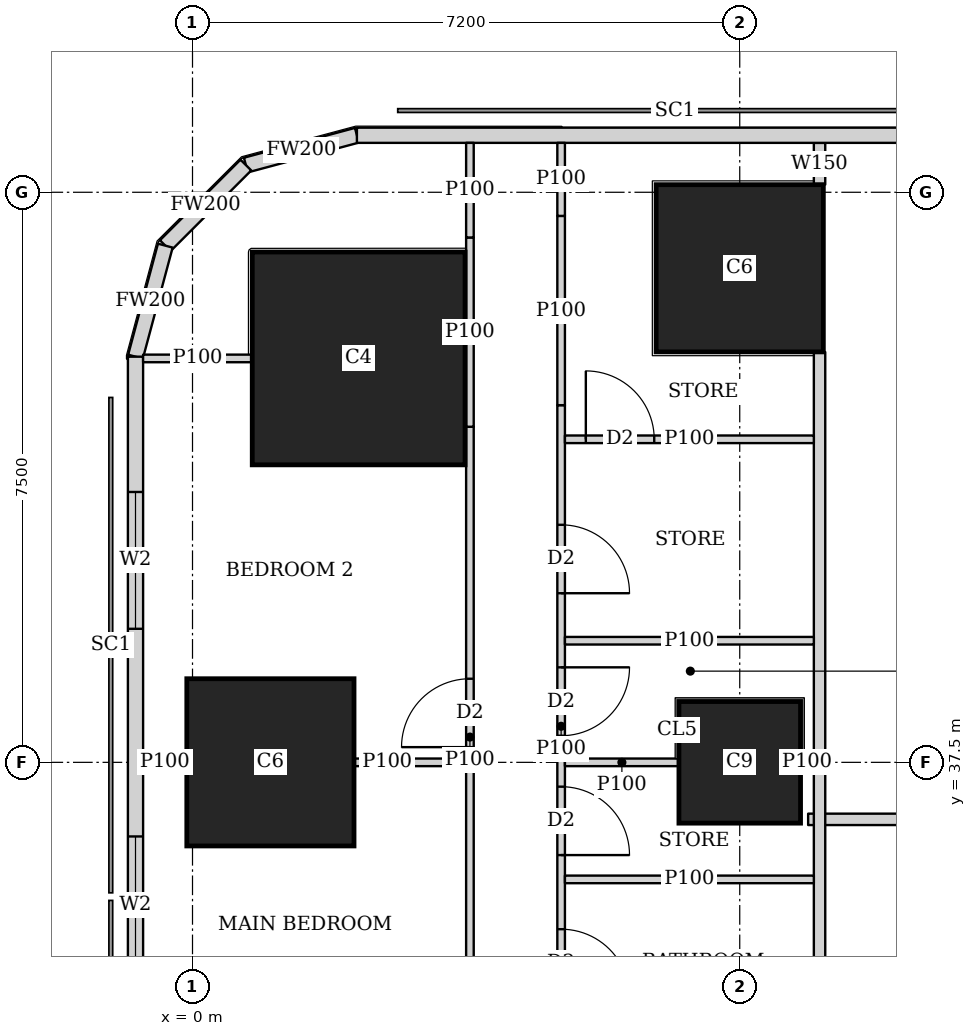
"""IFC4 building model, lengths in metres.
Left out: names, types, materials, properties, quantities, classifications, styles, units other than length and angle.
Written with IfcOpenShell. Run it as: python <this file> out.ifc"""

import sys

from ifc_helpers import new_model, si_unit, direction, frame, frame_2d, origin, origin_2d, place, context, subcontext, project, spatial, rectangle, extrude, element, fill, save


model = new_model("IFC4")
c1 = context("Model", 3, precision=1e-05, world=origin(), true_north=direction((0.0, 1.0)))
c2 = subcontext(c1, "Body", "Model", "MODEL_VIEW")
j1 = project(units=[si_unit("LENGTHUNIT", "METRE"), si_unit("PLANEANGLEUNIT", "RADIAN")], contexts=[c1])
p1 = place(None, origin())
s1 = spatial("IfcSite", under=j1, at=p1, CompositionType="ELEMENT")
p2 = place(p1, origin())
s2 = spatial("IfcBuilding", under=s1, at=p2, CompositionType="ELEMENT")
p3 = place(p2, frame((0.0, 0.0, 126.65)))
s3 = spatial("IfcBuildingStorey", under=s2, at=p3, CompositionType="ELEMENT", Elevation=126.65)
p4 = place(p3, frame((1.025, 37.5, 0.0), z_axis=(0.0, 0.0, 1.0), x_axis=(1.0, 0.0, 0.0)))
e1 = element("IfcColumn", 1, at=p4, inside=s3, PredefinedType="COLUMN", context=c2, shape_type="SweptSolid", body=[
    extrude(rectangle(XDim=2.2, YDim=2.2, at=origin_2d()), origin(), (0.0, 0.0, 1.0), 3.75),
])
p5 = place(p3, frame((7.2, 37.5, 0.0), z_axis=(0.0, 0.0, 1.0), x_axis=(1.0, 0.0, 0.0)))
e2 = element("IfcColumn", 2, at=p5, inside=s3, PredefinedType="COLUMN", context=c2, shape_type="SweptSolid", body=[
    extrude(rectangle(XDim=1.6, YDim=1.6, at=origin_2d()), origin(), (0.0, 0.0, 1.0), 3.75),
])
p6 = place(p3, frame((2.186, 42.814, 0.0), z_axis=(0.0, 0.0, 1.0), x_axis=(1.0, 0.0, 0.0)))
e3 = element("IfcColumn", 3, at=p6, inside=s3, PredefinedType="COLUMN", context=c2, shape_type="SweptSolid", body=[
    extrude(rectangle(XDim=2.8, YDim=2.8, at=origin_2d()), origin(), (0.0, 0.0, 1.0), 3.75),
])
p7 = place(p3, frame((7.2, 44.0, 0.0), z_axis=(0.0, 0.0, 1.0), x_axis=(1.0, 0.0, 0.0)))
e4 = element("IfcColumn", 4, at=p7, inside=s3, PredefinedType="COLUMN", context=c2, shape_type="SweptSolid", body=[
    extrude(rectangle(XDim=2.2, YDim=2.2, at=origin_2d()), origin(), (0.0, 0.0, 1.0), 3.75),
])
p8 = place(p3, frame((40.106, 45.75, 0.0), z_axis=(0.0, 0.0, 1.0), x_axis=(-1.0, 0.0, 0.0)))
e5 = element("IfcWall", 5, at=p8, inside=s3, PredefinedType="SOLIDWALL", context=c2, shape_type="SweptSolid", body=[
    extrude(rectangle(XDim=37.943, YDim=0.2, at=frame_2d((18.971, 0.0))), origin(), (0.0, 0.0, 1.0), 3.45),
])
p9 = place(p8, frame((8.606, 0.0, 0.9)))
e6 = element("IfcOpeningElement", 6, at=p9, cuts=e5, PredefinedType="OPENING", context=c2, shape_type="SweptSolid", body=[
    extrude(rectangle(XDim=1.8, YDim=1.5, at=frame_2d((0.9, 0.75))), frame((0.0, 0.11, 0.0), z_axis=(0.0, -1.0, 0.0), x_axis=(1.0, 0.0, 0.0)), (0.0, 0.0, 1.0), 0.22),
])
p10 = place(p8, frame((12.206, 0.0, 0.9)))
e7 = element("IfcOpeningElement", 7, at=p10, cuts=e5, PredefinedType="OPENING", context=c2, shape_type="SweptSolid", body=[
    extrude(rectangle(XDim=1.8, YDim=1.5, at=frame_2d((0.9, 0.75))), frame((0.0, 0.11, 0.0), z_axis=(0.0, -1.0, 0.0), x_axis=(1.0, 0.0, 0.0)), (0.0, 0.0, 1.0), 0.22),
])
p11 = place(p8, frame((15.806, 0.0, 0.9)))
e8 = element("IfcOpeningElement", 8, at=p11, cuts=e5, PredefinedType="OPENING", context=c2, shape_type="SweptSolid", body=[
    extrude(rectangle(XDim=1.8, YDim=1.5, at=frame_2d((0.9, 0.75))), frame((0.0, 0.11, 0.0), z_axis=(0.0, -1.0, 0.0), x_axis=(1.0, 0.0, 0.0)), (0.0, 0.0, 1.0), 0.22),
])
p12 = place(p8, frame((19.406, 0.0, 0.9)))
e9 = element("IfcOpeningElement", 9, at=p12, cuts=e5, PredefinedType="OPENING", context=c2, shape_type="SweptSolid", body=[
    extrude(rectangle(XDim=1.8, YDim=1.5, at=frame_2d((0.9, 0.75))), frame((0.0, 0.11, 0.0), z_axis=(0.0, -1.0, 0.0), x_axis=(1.0, 0.0, 0.0)), (0.0, 0.0, 1.0), 0.22),
])
p13 = place(p8, frame((23.006, 0.0, 0.9)))
e10 = element("IfcOpeningElement", 10, at=p13, cuts=e5, PredefinedType="OPENING", context=c2, shape_type="SweptSolid", body=[
    extrude(rectangle(XDim=1.8, YDim=1.5, at=frame_2d((0.9, 0.75))), frame((0.0, 0.11, 0.0), z_axis=(0.0, -1.0, 0.0), x_axis=(1.0, 0.0, 0.0)), (0.0, 0.0, 1.0), 0.22),
])
p14 = place(p8, frame((26.606, 0.0, 0.9)))
e11 = element("IfcOpeningElement", 11, at=p14, cuts=e5, PredefinedType="OPENING", context=c2, shape_type="SweptSolid", body=[
    extrude(rectangle(XDim=1.8, YDim=1.5, at=frame_2d((0.9, 0.75))), frame((0.0, 0.11, 0.0), z_axis=(0.0, -1.0, 0.0), x_axis=(1.0, 0.0, 0.0)), (0.0, 0.0, 1.0), 0.22),
])
p15 = place(p3, frame((2.163, 45.75, 0.0), z_axis=(0.0, 0.0, 1.0), x_axis=(-0.965832000415, -0.259168954497, 0.0)))
e12 = element("IfcWall", 12, at=p15, inside=s3, PredefinedType="SOLIDWALL", context=c2, shape_type="SweptSolid", body=[
    extrude(rectangle(XDim=1.513, YDim=0.2, at=frame_2d((0.756, 0.0))), origin(), (0.0, 0.0, 1.0), 3.45),
])
p16 = place(p3, frame((0.702, 45.358, 0.0), z_axis=(0.0, 0.0, 1.0), x_axis=(-0.707106781187, -0.707106781187, 0.0)))
e13 = element("IfcWall", 13, at=p16, inside=s3, PredefinedType="SOLIDWALL", context=c2, shape_type="SweptSolid", body=[
    extrude(rectangle(XDim=1.499, YDim=0.2, at=frame_2d((0.75, 0.0))), origin(), (0.0, 0.0, 1.0), 3.45),
])
p17 = place(p3, frame((-0.358, 44.298, 0.0), z_axis=(0.0, 0.0, 1.0), x_axis=(-0.259168954497, -0.965832000415, 0.0)))
e14 = element("IfcWall", 14, at=p17, inside=s3, PredefinedType="SOLIDWALL", context=c2, shape_type="SweptSolid", body=[
    extrude(rectangle(XDim=1.513, YDim=0.2, at=frame_2d((0.756, 0.0))), origin(), (0.0, 0.0, 1.0), 3.45),
])
p18 = place(p3, frame((-0.75, 42.837, 0.0), z_axis=(0.0, 0.0, 1.0), x_axis=(0.0, -1.0, 0.0)))
e15 = element("IfcWall", 15, at=p18, inside=s3, PredefinedType="SOLIDWALL", context=c2, shape_type="SweptSolid", body=[
    extrude(rectangle(XDim=40.674, YDim=0.2, at=frame_2d((20.337, 0.0))), origin(), (0.0, 0.0, 1.0), 3.45),
])
p19 = place(p18, frame((1.78, 0.0, 0.9)))
e16 = element("IfcOpeningElement", 16, at=p19, cuts=e15, PredefinedType="OPENING", context=c2, shape_type="SweptSolid", body=[
    extrude(rectangle(XDim=1.8, YDim=1.5, at=frame_2d((0.9, 0.75))), frame((0.0, 0.11, 0.0), z_axis=(0.0, -1.0, 0.0), x_axis=(1.0, 0.0, 0.0)), (0.0, 0.0, 1.0), 0.22),
])
p20 = place(p18, frame((6.312, 0.0, 0.9)))
e17 = element("IfcOpeningElement", 17, at=p20, cuts=e15, PredefinedType="OPENING", context=c2, shape_type="SweptSolid", body=[
    extrude(rectangle(XDim=1.8, YDim=1.5, at=frame_2d((0.9, 0.75))), frame((0.0, 0.11, 0.0), z_axis=(0.0, -1.0, 0.0), x_axis=(1.0, 0.0, 0.0)), (0.0, 0.0, 1.0), 0.22),
])
p21 = place(p18, frame((10.062, 0.0, 0.9)))
e18 = element("IfcOpeningElement", 18, at=p21, cuts=e15, PredefinedType="OPENING", context=c2, shape_type="SweptSolid", body=[
    extrude(rectangle(XDim=1.8, YDim=1.5, at=frame_2d((0.9, 0.75))), frame((0.0, 0.11, 0.0), z_axis=(0.0, -1.0, 0.0), x_axis=(1.0, 0.0, 0.0)), (0.0, 0.0, 1.0), 0.22),
])
p22 = place(p18, frame((13.812, 0.0, 0.9)))
e19 = element("IfcOpeningElement", 19, at=p22, cuts=e15, PredefinedType="OPENING", context=c2, shape_type="SweptSolid", body=[
    extrude(rectangle(XDim=1.8, YDim=1.5, at=frame_2d((0.9, 0.75))), frame((0.0, 0.11, 0.0), z_axis=(0.0, -1.0, 0.0), x_axis=(1.0, 0.0, 0.0)), (0.0, 0.0, 1.0), 0.22),
])
p23 = place(p18, frame((17.562, 0.0, 0.9)))
e20 = element("IfcOpeningElement", 20, at=p23, cuts=e15, PredefinedType="OPENING", context=c2, shape_type="SweptSolid", body=[
    extrude(rectangle(XDim=1.8, YDim=1.5, at=frame_2d((0.9, 0.75))), frame((0.0, 0.11, 0.0), z_axis=(0.0, -1.0, 0.0), x_axis=(1.0, 0.0, 0.0)), (0.0, 0.0, 1.0), 0.22),
])
p24 = place(p18, frame((21.312, 0.0, 0.9)))
e21 = element("IfcOpeningElement", 21, at=p24, cuts=e15, PredefinedType="OPENING", context=c2, shape_type="SweptSolid", body=[
    extrude(rectangle(XDim=1.8, YDim=1.5, at=frame_2d((0.9, 0.75))), frame((0.0, 0.11, 0.0), z_axis=(0.0, -1.0, 0.0), x_axis=(1.0, 0.0, 0.0)), (0.0, 0.0, 1.0), 0.22),
])
p25 = place(p18, frame((25.062, 0.0, 0.9)))
e22 = element("IfcOpeningElement", 22, at=p25, cuts=e15, PredefinedType="OPENING", context=c2, shape_type="SweptSolid", body=[
    extrude(rectangle(XDim=1.8, YDim=1.5, at=frame_2d((0.9, 0.75))), frame((0.0, 0.11, 0.0), z_axis=(0.0, -1.0, 0.0), x_axis=(1.0, 0.0, 0.0)), (0.0, 0.0, 1.0), 0.22),
])
p26 = place(p18, frame((28.812, 0.0, 0.9)))
e23 = element("IfcOpeningElement", 23, at=p26, cuts=e15, PredefinedType="OPENING", context=c2, shape_type="SweptSolid", body=[
    extrude(rectangle(XDim=1.8, YDim=1.5, at=frame_2d((0.9, 0.75))), frame((0.0, 0.11, 0.0), z_axis=(0.0, -1.0, 0.0), x_axis=(1.0, 0.0, 0.0)), (0.0, 0.0, 1.0), 0.22),
])
p27 = place(p18, frame((32.562, 0.0, 0.9)))
e24 = element("IfcOpeningElement", 24, at=p27, cuts=e15, PredefinedType="OPENING", context=c2, shape_type="SweptSolid", body=[
    extrude(rectangle(XDim=1.8, YDim=1.5, at=frame_2d((0.9, 0.75))), frame((0.0, 0.11, 0.0), z_axis=(0.0, -1.0, 0.0), x_axis=(1.0, 0.0, 0.0)), (0.0, 0.0, 1.0), 0.22),
])
p28 = place(p18, frame((37.094, 0.0, 0.9)))
e25 = element("IfcOpeningElement", 25, at=p28, cuts=e15, PredefinedType="OPENING", context=c2, shape_type="SweptSolid", body=[
    extrude(rectangle(XDim=1.8, YDim=1.5, at=frame_2d((0.9, 0.75))), frame((0.0, 0.11, 0.0), z_axis=(0.0, -1.0, 0.0), x_axis=(1.0, 0.0, 0.0)), (0.0, 0.0, 1.0), 0.22),
])
p29 = place(p3, frame((8.25, 2.126, 0.0), z_axis=(0.0, 0.0, 1.0), x_axis=(0.0, 1.0, 0.0)))
e26 = element("IfcWall", 26, at=p29, inside=s3, PredefinedType="SOLIDWALL", context=c2, shape_type="SweptSolid", body=[
    extrude(rectangle(XDim=40.773, YDim=0.15, at=frame_2d((20.386, 0.0))), origin(), (0.0, 0.0, 1.0), 3.45),
])
p30 = place(p29, frame((10.286, 0.0, 0.0)))
e27 = element("IfcOpeningElement", 27, at=p30, cuts=e26, PredefinedType="OPENING", context=c2, shape_type="SweptSolid", body=[
    extrude(rectangle(XDim=1.0, YDim=2.1, at=frame_2d((0.5, 1.05))), frame((0.0, 0.085, 0.0), z_axis=(0.0, -1.0, 0.0), x_axis=(1.0, 0.0, 0.0)), (0.0, 0.0, 1.0), 0.17),
])
p31 = place(p29, frame((14.461, 0.0, 0.0)))
e28 = element("IfcOpeningElement", 28, at=p31, cuts=e26, PredefinedType="OPENING", context=c2, shape_type="SweptSolid", body=[
    extrude(rectangle(XDim=1.0, YDim=2.1, at=frame_2d((0.5, 1.05))), frame((0.0, 0.085, 0.0), z_axis=(0.0, -1.0, 0.0), x_axis=(1.0, 0.0, 0.0)), (0.0, 0.0, 1.0), 0.17),
])
p32 = place(p29, frame((21.962, 0.0, 0.0)))
e29 = element("IfcOpeningElement", 29, at=p32, cuts=e26, PredefinedType="OPENING", context=c2, shape_type="SweptSolid", body=[
    extrude(rectangle(XDim=1.0, YDim=2.1, at=frame_2d((0.5, 1.05))), frame((0.0, 0.085, 0.0), z_axis=(0.0, -1.0, 0.0), x_axis=(1.0, 0.0, 0.0)), (0.0, 0.0, 1.0), 0.17),
])
p33 = place(p29, frame((29.461, 0.0, 0.0)))
e30 = element("IfcOpeningElement", 30, at=p33, cuts=e26, PredefinedType="OPENING", context=c2, shape_type="SweptSolid", body=[
    extrude(rectangle(XDim=1.0, YDim=2.1, at=frame_2d((0.5, 1.05))), frame((0.0, 0.085, 0.0), z_axis=(0.0, -1.0, 0.0), x_axis=(1.0, 0.0, 0.0)), (0.0, 0.0, 1.0), 0.17),
])
p34 = place(p3, frame((8.25, 45.101, 0.0), z_axis=(0.0, 0.0, 1.0), x_axis=(0.0, 1.0, 0.0)))
e31 = element("IfcWall", 31, at=p34, inside=s3, PredefinedType="SOLIDWALL", context=c2, shape_type="SweptSolid", body=[
    extrude(rectangle(XDim=0.549, YDim=0.15, at=frame_2d((0.274, 0.0))), origin(), (0.0, 0.0, 1.0), 3.45),
])
p35 = place(p3, frame((8.1, 36.75, 0.0), z_axis=(0.0, 0.0, 1.0), x_axis=(1.0, 0.0, 0.0)))
e32 = element("IfcWall", 32, at=p35, inside=s3, PredefinedType="SOLIDWALL", context=c2, shape_type="SweptSolid", body=[
    extrude(rectangle(XDim=5.499, YDim=0.15, at=frame_2d((2.75, 0.0))), origin(), (0.0, 0.0, 1.0), 3.45),
])
p36 = place(p35, frame((2.725, 0.0, 0.0)))
e33 = element("IfcOpeningElement", 33, at=p36, cuts=e32, PredefinedType="OPENING", context=c2, shape_type="SweptSolid", body=[
    extrude(rectangle(XDim=1.0, YDim=2.1, at=frame_2d((0.5, 1.05))), frame((0.0, 0.085, 0.0), z_axis=(0.0, -1.0, 0.0), x_axis=(1.0, 0.0, 0.0)), (0.0, 0.0, 1.0), 0.17),
])
p37 = place(p3, frame((3.65, 33.75, 0.0), z_axis=(0.0, 0.0, 1.0), x_axis=(0.0, 1.0, 0.0)))
e34 = element("IfcWall", 34, at=p37, inside=s3, PredefinedType="PARTITIONING", context=c2, shape_type="SweptSolid", body=[
    extrude(rectangle(XDim=8.165, YDim=0.1, at=frame_2d((4.083, 0.0))), origin(), (0.0, 0.0, 1.0), 3.45),
])
p38 = place(p37, frame((0.2, 0.0, 0.0)))
e35 = element("IfcOpeningElement", 35, at=p38, cuts=e34, PredefinedType="OPENING", context=c2, shape_type="SweptSolid", body=[
    extrude(rectangle(XDim=0.9, YDim=2.1, at=frame_2d((0.45, 1.05))), frame((0.0, 0.06, 0.0), z_axis=(0.0, -1.0, 0.0), x_axis=(1.0, 0.0, 0.0)), (0.0, 0.0, 1.0), 0.12),
])
p39 = place(p37, frame((3.95, 0.0, 0.0)))
e36 = element("IfcOpeningElement", 36, at=p39, cuts=e34, PredefinedType="OPENING", context=c2, shape_type="SweptSolid", body=[
    extrude(rectangle(XDim=0.9, YDim=2.1, at=frame_2d((0.45, 1.05))), frame((0.0, 0.06, 0.0), z_axis=(0.0, -1.0, 0.0), x_axis=(1.0, 0.0, 0.0)), (0.0, 0.0, 1.0), 0.12),
])
p40 = place(p3, frame((3.65, 41.915, 0.0), z_axis=(0.0, 0.0, 1.0), x_axis=(0.0, 1.0, 0.0)))
e37 = element("IfcWall", 37, at=p40, inside=s3, PredefinedType="PARTITIONING", context=c2, shape_type="SweptSolid", body=[
    extrude(rectangle(XDim=2.49, YDim=0.1, at=frame_2d((1.245, 0.0))), origin(), (0.0, 0.0, 1.0), 2.0),
])
p41 = place(p3, frame((3.65, 44.405, 0.0), z_axis=(0.0, 0.0, 1.0), x_axis=(0.0, 1.0, 0.0)))
e38 = element("IfcWall", 38, at=p41, inside=s3, PredefinedType="PARTITIONING", context=c2, shape_type="SweptSolid", body=[
    extrude(rectangle(XDim=1.245, YDim=0.1, at=frame_2d((0.623, 0.0))), origin(), (0.0, 0.0, 1.0), 3.45),
])
p42 = place(p3, frame((4.85, 33.75, 0.0), z_axis=(0.0, 0.0, 1.0), x_axis=(0.0, 1.0, 0.0)))
e39 = element("IfcWall", 39, at=p42, inside=s3, PredefinedType="PARTITIONING", context=c2, shape_type="SweptSolid", body=[
    extrude(rectangle(XDim=8.449, YDim=0.1, at=frame_2d((4.225, 0.0))), origin(), (0.0, 0.0, 1.0), 3.45),
])
p43 = place(p42, frame((0.655, 0.0, 0.0)))
e40 = element("IfcOpeningElement", 40, at=p43, cuts=e39, PredefinedType="OPENING", context=c2, shape_type="SweptSolid", body=[
    extrude(rectangle(XDim=0.9, YDim=2.1, at=frame_2d((0.45, 1.05))), frame((0.0, 0.06, 0.0), z_axis=(0.0, -1.0, 0.0), x_axis=(1.0, 0.0, 0.0)), (0.0, 0.0, 1.0), 0.12),
])
p44 = place(p42, frame((4.1, 0.0, 0.0)))
e41 = element("IfcOpeningElement", 41, at=p44, cuts=e39, PredefinedType="OPENING", context=c2, shape_type="SweptSolid", body=[
    extrude(rectangle(XDim=0.9, YDim=2.1, at=frame_2d((0.45, 1.05))), frame((0.0, 0.06, 0.0), z_axis=(0.0, -1.0, 0.0), x_axis=(1.0, 0.0, 0.0)), (0.0, 0.0, 1.0), 0.12),
])
p45 = place(p42, frame((2.53, 0.0, 0.0)))
e42 = element("IfcOpeningElement", 42, at=p45, cuts=e39, PredefinedType="OPENING", context=c2, shape_type="SweptSolid", body=[
    extrude(rectangle(XDim=0.9, YDim=2.1, at=frame_2d((0.45, 1.05))), frame((0.0, 0.06, 0.0), z_axis=(0.0, -1.0, 0.0), x_axis=(1.0, 0.0, 0.0)), (0.0, 0.0, 1.0), 0.12),
])
p46 = place(p42, frame((5.975, 0.0, 0.0)))
e43 = element("IfcOpeningElement", 43, at=p46, cuts=e39, PredefinedType="OPENING", context=c2, shape_type="SweptSolid", body=[
    extrude(rectangle(XDim=0.9, YDim=2.1, at=frame_2d((0.45, 1.05))), frame((0.0, 0.06, 0.0), z_axis=(0.0, -1.0, 0.0), x_axis=(1.0, 0.0, 0.0)), (0.0, 0.0, 1.0), 0.12),
])
p47 = place(p3, frame((4.85, 42.199, 0.0), z_axis=(0.0, 0.0, 1.0), x_axis=(0.0, 1.0, 0.0)))
e44 = element("IfcWall", 44, at=p47, inside=s3, PredefinedType="PARTITIONING", context=c2, shape_type="SweptSolid", body=[
    extrude(rectangle(XDim=2.49, YDim=0.1, at=frame_2d((1.245, 0.0))), origin(), (0.0, 0.0, 1.0), 2.0),
])
p48 = place(p3, frame((4.85, 44.689, 0.0), z_axis=(0.0, 0.0, 1.0), x_axis=(0.0, 1.0, 0.0)))
e45 = element("IfcWall", 45, at=p48, inside=s3, PredefinedType="PARTITIONING", context=c2, shape_type="SweptSolid", body=[
    extrude(rectangle(XDim=0.961, YDim=0.1, at=frame_2d((0.48, 0.0))), origin(), (0.0, 0.0, 1.0), 3.45),
])
p49 = place(p3, frame((-0.65, 37.5, 0.0), z_axis=(0.0, 0.0, 1.0), x_axis=(1.0, 0.0, 0.0)))
e46 = element("IfcWall", 46, at=p49, inside=s3, PredefinedType="PARTITIONING", context=c2, shape_type="SweptSolid", body=[
    extrude(rectangle(XDim=0.574, YDim=0.1, at=frame_2d((0.287, 0.0))), origin(), (0.0, 0.0, 1.0), 2.0),
])
p50 = place(p3, frame((2.126, 37.5, 0.0), z_axis=(0.0, 0.0, 1.0), x_axis=(1.0, 0.0, 0.0)))
e47 = element("IfcWall", 47, at=p50, inside=s3, PredefinedType="PARTITIONING", context=c2, shape_type="SweptSolid", body=[
    extrude(rectangle(XDim=1.474, YDim=0.1, at=frame_2d((0.737, 0.0))), origin(), (0.0, 0.0, 1.0), 2.0),
])
p51 = place(p3, frame((-0.65, 42.814, 0.0), z_axis=(0.0, 0.0, 1.0), x_axis=(1.0, 0.0, 0.0)))
e48 = element("IfcWall", 48, at=p51, inside=s3, PredefinedType="PARTITIONING", context=c2, shape_type="SweptSolid", body=[
    extrude(rectangle(XDim=1.435, YDim=0.1, at=frame_2d((0.717, 0.0))), origin(), (0.0, 0.0, 1.0), 3.45),
])
p52 = place(p3, frame((4.9, 37.5, 0.0), z_axis=(0.0, 0.0, 1.0), x_axis=(1.0, 0.0, 0.0)))
e49 = element("IfcWall", 49, at=p52, inside=s3, PredefinedType="PARTITIONING", context=c2, shape_type="SweptSolid", body=[
    extrude(rectangle(XDim=1.499, YDim=0.1, at=frame_2d((0.75, 0.0))), origin(), (0.0, 0.0, 1.0), 3.45),
])
p53 = place(p3, frame((8.001, 37.5, 0.0), z_axis=(0.0, 0.0, 1.0), x_axis=(1.0, 0.0, 0.0)))
e50 = element("IfcWall", 50, at=p53, inside=s3, PredefinedType="PARTITIONING", context=c2, shape_type="SweptSolid", body=[
    extrude(rectangle(XDim=0.174, YDim=0.1, at=frame_2d((0.087, 0.0))), origin(), (0.0, 0.0, 1.0), 3.45),
])
for number, where, z_axis, x_axis in (
    (51, (4.9, 35.96, 0.0), (0.0, 0.0, 1.0), (1.0, 0.0, 0.0)),
    (52, (4.9, 39.1, 0.0), (0.0, 0.0, 1.0), (1.0, 0.0, 0.0)),
):
    element("IfcWall", number, at=place(p3, frame(where, z_axis=z_axis, x_axis=x_axis)), inside=s3, PredefinedType="PARTITIONING", context=c2, shape_type="SweptSolid", body=[
        extrude(rectangle(XDim=3.275, YDim=0.1, at=frame_2d((1.638, 0.0))), origin(), (0.0, 0.0, 1.0), 3.45),
    ])
p54 = place(p3, frame((8.175, 41.75, 0.0), z_axis=(0.0, 0.0, 1.0), x_axis=(-1.0, 0.0, 0.0)))
e53 = element("IfcWall", 53, at=p54, inside=s3, PredefinedType="PARTITIONING", context=c2, shape_type="SweptSolid", body=[
    extrude(rectangle(XDim=3.275, YDim=0.1, at=frame_2d((1.638, 0.0))), origin(), (0.0, 0.0, 1.0), 3.45),
])
p55 = place(p54, frame((2.1, 0.0, 0.0)))
e54 = element("IfcOpeningElement", 54, at=p55, cuts=e53, PredefinedType="OPENING", context=c2, shape_type="SweptSolid", body=[
    extrude(rectangle(XDim=0.9, YDim=2.1, at=frame_2d((0.45, 1.05))), frame((0.0, 0.06, 0.0), z_axis=(0.0, -1.0, 0.0), x_axis=(1.0, 0.0, 0.0)), (0.0, 0.0, 1.0), 0.12),
])
p56 = place(p19, origin())
e55 = element("IfcWindow", 55, at=p56, inside=s3, PartitioningType="SINGLE_PANEL", PredefinedType="WINDOW", context=c2, shape_type="SweptSolid", body=[
    extrude(rectangle(XDim=1.8, YDim=1.5, at=frame_2d((0.9, 0.75))), frame((0.0, 0.03, 0.0), z_axis=(0.0, -1.0, 0.0), x_axis=(1.0, 0.0, 0.0)), (0.0, 0.0, 1.0), 0.06),
])
fill(e16, e55)
p57 = place(p20, origin())
e56 = element("IfcWindow", 56, at=p57, inside=s3, PartitioningType="SINGLE_PANEL", PredefinedType="WINDOW", context=c2, shape_type="SweptSolid", body=[
    extrude(rectangle(XDim=1.8, YDim=1.5, at=frame_2d((0.9, 0.75))), frame((0.0, 0.03, 0.0), z_axis=(0.0, -1.0, 0.0), x_axis=(1.0, 0.0, 0.0)), (0.0, 0.0, 1.0), 0.06),
])
fill(e17, e56)
p58 = place(p39, origin())
e57 = element("IfcDoor", 57, at=p58, inside=s3, OperationType="SINGLE_SWING_LEFT", PredefinedType="DOOR", context=c2, shape_type="SweptSolid", body=[
    extrude(rectangle(XDim=0.9, YDim=2.1, at=frame_2d((0.45, 1.05))), frame((0.0, 0.025, 0.0), z_axis=(0.0, -1.0, 0.0), x_axis=(1.0, 0.0, 0.0)), (0.0, 0.0, 1.0), 0.05),
])
fill(e36, e57)
p59 = place(p43, origin())
e58 = element("IfcDoor", 58, at=p59, inside=s3, OperationType="SINGLE_SWING_RIGHT", PredefinedType="DOOR", context=c2, shape_type="SweptSolid", body=[
    extrude(rectangle(XDim=0.9, YDim=2.1, at=frame_2d((0.45, 1.05))), frame((0.0, 0.025, 0.0), z_axis=(0.0, -1.0, 0.0), x_axis=(1.0, 0.0, 0.0)), (0.0, 0.0, 1.0), 0.05),
])
fill(e40, e58)
p60 = place(p44, origin())
e59 = element("IfcDoor", 59, at=p60, inside=s3, OperationType="SINGLE_SWING_LEFT", PredefinedType="DOOR", context=c2, shape_type="SweptSolid", body=[
    extrude(rectangle(XDim=0.9, YDim=2.1, at=frame_2d((0.45, 1.05))), frame((0.0, 0.025, 0.0), z_axis=(0.0, -1.0, 0.0), x_axis=(1.0, 0.0, 0.0)), (0.0, 0.0, 1.0), 0.05),
])
fill(e41, e59)
p61 = place(p45, origin())
e60 = element("IfcDoor", 60, at=p61, inside=s3, OperationType="SINGLE_SWING_RIGHT", PredefinedType="DOOR", context=c2, shape_type="SweptSolid", body=[
    extrude(rectangle(XDim=0.9, YDim=2.1, at=frame_2d((0.45, 1.05))), frame((0.0, 0.025, 0.0), z_axis=(0.0, -1.0, 0.0), x_axis=(1.0, 0.0, 0.0)), (0.0, 0.0, 1.0), 0.05),
])
fill(e42, e60)
p62 = place(p46, origin())
e61 = element("IfcDoor", 61, at=p62, inside=s3, OperationType="SINGLE_SWING_RIGHT", PredefinedType="DOOR", context=c2, shape_type="SweptSolid", body=[
    extrude(rectangle(XDim=0.9, YDim=2.1, at=frame_2d((0.45, 1.05))), frame((0.0, 0.025, 0.0), z_axis=(0.0, -1.0, 0.0), x_axis=(1.0, 0.0, 0.0)), (0.0, 0.0, 1.0), 0.05),
])
fill(e43, e61)
p63 = place(p55, origin())
e62 = element("IfcDoor", 62, at=p63, inside=s3, OperationType="SINGLE_SWING_LEFT", PredefinedType="DOOR", context=c2, shape_type="SweptSolid", body=[
    extrude(rectangle(XDim=0.9, YDim=2.1, at=frame_2d((0.45, 1.05))), frame((0.0, 0.025, 0.0), z_axis=(0.0, -1.0, 0.0), x_axis=(1.0, 0.0, 0.0)), (0.0, 0.0, 1.0), 0.05),
])
fill(e54, e62)
save(model, sys.argv[1])
